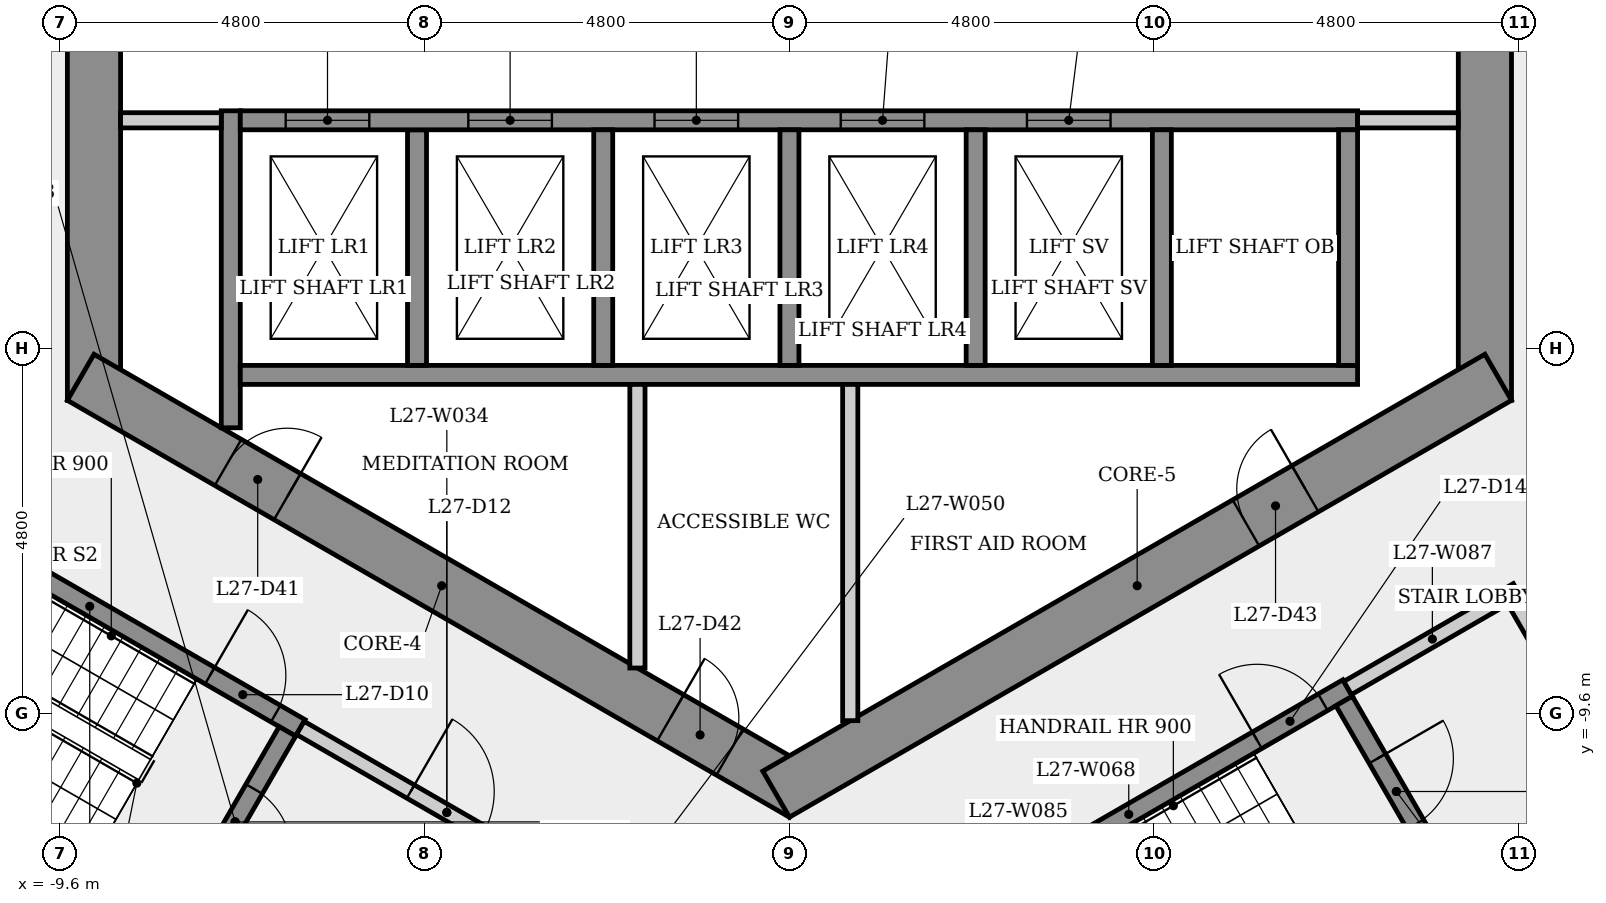
"""IFC4 building model, lengths in metres.
Left out: names, types, materials, properties, quantities, classifications, styles, units other than length and angle.
Written with IfcOpenShell. Run it as: python <this file> out.ifc"""

import sys

from ifc_helpers import new_model, si_unit, direction, frame, frame_2d, origin, place, context, subcontext, project, spatial, rectangle, extrude, element, fill, save


model = new_model("IFC4")
c1 = context("Model", 3, precision=1e-05, world=origin(), true_north=direction((0.0, 1.0)))
c2 = subcontext(c1, "Body", "Model", "MODEL_VIEW")
j1 = project(units=[si_unit("LENGTHUNIT", "METRE"), si_unit("PLANEANGLEUNIT", "RADIAN")], contexts=[c1])
p1 = place(None, origin())
s1 = spatial("IfcSite", under=j1, at=p1, CompositionType="ELEMENT")
p2 = place(p1, origin())
s2 = spatial("IfcBuilding", under=s1, at=p2, CompositionType="ELEMENT")
p3 = place(p2, frame((0.0, 0.0, 103.5)))
s3 = spatial("IfcBuildingStorey", under=s2, at=p3, CompositionType="ELEMENT", Elevation=103.5)
p4 = place(p3, frame((9.15, -5.485, 0.0), z_axis=(0.0, 0.0, 1.0), x_axis=(0.0, 1.0, 0.0)))
e1 = element("IfcWall", 1, at=p4, inside=s3, PredefinedType="SHEAR", context=c2, shape_type="SweptSolid", body=[
    extrude(rectangle(XDim=10.97, YDim=0.7, at=frame_2d((5.485, 0.0))), origin(), (0.0, 0.0, 1.0), 3.4),
])
p5 = place(p4, frame((4.685, 0.0, 0.0)))
e2 = element("IfcOpeningElement", 2, at=p5, cuts=e1, PredefinedType="OPENING", context=c2, shape_type="SweptSolid", body=[
    extrude(rectangle(XDim=1.6, YDim=2.1, at=frame_2d((0.8, 1.05))), frame((0.0, 0.36, 0.0), z_axis=(0.0, -1.0, 0.0), x_axis=(1.0, 0.0, 0.0)), (0.0, 0.0, 1.0), 0.72),
])
p6 = place(p3, frame((-9.15, 5.485, 0.0), z_axis=(0.0, 0.0, 1.0), x_axis=(0.0, -1.0, 0.0)))
e3 = element("IfcWall", 3, at=p6, inside=s3, PredefinedType="SHEAR", context=c2, shape_type="SweptSolid", body=[
    extrude(rectangle(XDim=10.97, YDim=0.7, at=frame_2d((5.485, 0.0))), origin(), (0.0, 0.0, 1.0), 3.4),
])
p7 = place(p6, frame((4.685, 0.0, 0.0)))
e4 = element("IfcOpeningElement", 4, at=p7, cuts=e3, PredefinedType="OPENING", context=c2, shape_type="SweptSolid", body=[
    extrude(rectangle(XDim=1.6, YDim=2.1, at=frame_2d((0.8, 1.05))), frame((0.0, 0.36, 0.0), z_axis=(0.0, -1.0, 0.0), x_axis=(1.0, 0.0, 0.0)), (0.0, 0.0, 1.0), 0.72),
])
p8 = place(p3, frame((-9.325, -5.182, 0.0), z_axis=(0.0, 0.0, 1.0), x_axis=(0.866023993627, -0.500002442456, 0.0)))
e5 = element("IfcWall", 5, at=p8, inside=s3, PredefinedType="SHEAR", context=c2, shape_type="SweptSolid", body=[
    extrude(rectangle(XDim=10.97, YDim=0.7, at=frame_2d((5.485, 0.0))), origin(), (0.0, 0.0, 1.0), 3.4),
])
p9 = place(p8, frame((2.239, 0.0, 0.0)))
e6 = element("IfcOpeningElement", 6, at=p9, cuts=e5, PredefinedType="OPENING", context=c2, shape_type="SweptSolid", body=[
    extrude(rectangle(XDim=0.9, YDim=2.1, at=frame_2d((0.45, 1.05))), frame((0.0, 0.36, 0.0), z_axis=(0.0, -1.0, 0.0), x_axis=(1.0, 0.0, 0.0)), (0.0, 0.0, 1.0), 0.72),
])
p10 = place(p8, frame((8.96, 0.0, 0.0)))
e7 = element("IfcOpeningElement", 7, at=p10, cuts=e5, PredefinedType="OPENING", context=c2, shape_type="SweptSolid", body=[
    extrude(rectangle(XDim=0.9, YDim=2.1, at=frame_2d((0.45, 1.05))), frame((0.0, 0.36, 0.0), z_axis=(0.0, -1.0, 0.0), x_axis=(1.0, 0.0, 0.0)), (0.0, 0.0, 1.0), 0.72),
])
p11 = place(p3, frame((-0.175, -10.667, 0.0), z_axis=(0.0, 0.0, 1.0), x_axis=(0.866023993627, 0.500002442456, 0.0)))
e8 = element("IfcWall", 8, at=p11, inside=s3, PredefinedType="SHEAR", context=c2, shape_type="SweptSolid", body=[
    extrude(rectangle(XDim=10.97, YDim=0.7, at=frame_2d((5.485, 0.0))), origin(), (0.0, 0.0, 1.0), 3.4),
])
p12 = place(p11, frame((7.137, 0.0, 0.0)))
e9 = element("IfcOpeningElement", 9, at=p12, cuts=e8, PredefinedType="OPENING", context=c2, shape_type="SweptSolid", body=[
    extrude(rectangle(XDim=0.9, YDim=2.1, at=frame_2d((0.45, 1.05))), frame((0.0, 0.36, 0.0), z_axis=(0.0, -1.0, 0.0), x_axis=(1.0, 0.0, 0.0)), (0.0, 0.0, 1.0), 0.72),
])
p13 = place(p3, frame((-11.977, -6.595, 0.0), z_axis=(0.0, 0.0, 1.0), x_axis=(0.866025499775, -0.499999833739, 0.0)))
e10 = element("IfcWall", 10, at=p13, inside=s3, PredefinedType="SHEAR", context=c2, shape_type="SweptSolid", body=[
    extrude(rectangle(XDim=6.4, YDim=0.25, at=frame_2d((3.2, 0.0))), origin(), (0.0, 0.0, 1.0), 3.05),
])
p14 = place(p13, frame((5.025, 0.0, 0.0)))
e11 = element("IfcOpeningElement", 11, at=p14, cuts=e10, PredefinedType="OPENING", context=c2, shape_type="SweptSolid", body=[
    extrude(rectangle(XDim=1.0, YDim=2.1, at=frame_2d((0.5, 1.05))), frame((0.0, 0.135, 0.0), z_axis=(0.0, -1.0, 0.0), x_axis=(1.0, 0.0, 0.0)), (0.0, 0.0, 1.0), 0.27),
])
p15 = place(p3, frame((-7.935, -12.393, 0.0), z_axis=(0.0, 0.0, 1.0), x_axis=(-0.866025499775, 0.499999833739, 0.0)))
e12 = element("IfcWall", 12, at=p15, inside=s3, PredefinedType="SHEAR", context=c2, shape_type="SweptSolid", body=[
    extrude(rectangle(XDim=6.4, YDim=0.25, at=frame_2d((3.2, 0.0))), origin(), (0.0, 0.0, 1.0), 3.05),
])
p16 = place(p3, frame((-7.35, -5.846, 0.0), z_axis=(0.0, 0.0, 1.0), x_axis=(0.0, 1.0, 0.0)))
e13 = element("IfcWall", 13, at=p16, inside=s3, PredefinedType="SHEAR", context=c2, shape_type="SweptSolid", body=[
    extrude(rectangle(XDim=4.171, YDim=0.25, at=frame_2d((2.085, 0.0))), origin(), (0.0, 0.0, 1.0), 3.05),
])
p17 = place(p3, frame((-7.475, -1.8, 0.0), z_axis=(0.0, 0.0, 1.0), x_axis=(-1.0, 0.0, 0.0)))
e14 = element("IfcWall", 14, at=p17, inside=s3, PredefinedType="PARTITIONING", context=c2, shape_type="SweptSolid", body=[
    extrude(rectangle(XDim=1.325, YDim=0.2, at=frame_2d((0.663, 0.0))), origin(), (0.0, 0.0, 1.0), 3.05),
])
p18 = place(p3, frame((-6.605, -9.841, 0.0), z_axis=(0.0, 0.0, 1.0), x_axis=(-0.499996545922, -0.866027397988, 0.0)))
e15 = element("IfcWall", 15, at=p18, inside=s3, PredefinedType="SHEAR", context=c2, shape_type="SweptSolid", body=[
    extrude(rectangle(XDim=2.75, YDim=0.25, at=frame_2d((1.375, 0.0))), origin(), (0.0, 0.0, 1.0), 3.05),
])
p19 = place(p18, frame((0.875, 0.0, 0.0)))
e16 = element("IfcOpeningElement", 16, at=p19, cuts=e15, PredefinedType="OPENING", context=c2, shape_type="SweptSolid", body=[
    extrude(rectangle(XDim=1.0, YDim=2.1, at=frame_2d((0.5, 1.05))), frame((0.0, 0.135, 0.0), z_axis=(0.0, -1.0, 0.0), x_axis=(1.0, 0.0, 0.0)), (0.0, 0.0, 1.0), 0.27),
])
p20 = place(p3, frame((-6.435, -9.795, 0.0), z_axis=(0.0, 0.0, 1.0), x_axis=(0.866012907634, -0.500021643343, 0.0)))
e17 = element("IfcWall", 17, at=p20, inside=s3, PredefinedType="PARTITIONING", context=c2, shape_type="SweptSolid", body=[
    extrude(rectangle(XDim=4.45, YDim=0.2, at=frame_2d((2.225, 0.0))), origin(), (0.0, 0.0, 1.0), 3.05),
])
p21 = place(p20, frame((1.675, 0.0, 0.0)))
e18 = element("IfcOpeningElement", 18, at=p21, cuts=e17, PredefinedType="OPENING", context=c2, shape_type="SweptSolid", body=[
    extrude(rectangle(XDim=1.1, YDim=2.1, at=frame_2d((0.55, 1.05))), frame((0.0, 0.11, 0.0), z_axis=(0.0, -1.0, 0.0), x_axis=(1.0, 0.0, 0.0)), (0.0, 0.0, 1.0), 0.22),
])
p22 = place(p3, frame((-7.225, -5.15, 0.0), z_axis=(0.0, 0.0, 1.0), x_axis=(1.0, 0.0, 0.0)))
e19 = element("IfcWall", 19, at=p22, inside=s3, PredefinedType="SHEAR", context=c2, shape_type="SweptSolid", body=[
    extrude(rectangle(XDim=14.7, YDim=0.25, at=frame_2d((7.35, 0.0))), origin(), (0.0, 0.0, 1.0), 3.05),
])
p23 = place(p3, frame((-4.9, -1.925, 0.0), z_axis=(0.0, 0.0, 1.0), x_axis=(0.0, -1.0, 0.0)))
e20 = element("IfcWall", 20, at=p23, inside=s3, PredefinedType="SHEAR", context=c2, shape_type="SweptSolid", body=[
    extrude(rectangle(XDim=3.1, YDim=0.25, at=frame_2d((1.55, 0.0))), origin(), (0.0, 0.0, 1.0), 3.4),
])
p24 = place(p3, frame((-7.225, -1.8, 0.0), z_axis=(0.0, 0.0, 1.0), x_axis=(1.0, 0.0, 0.0)))
e21 = element("IfcWall", 21, at=p24, inside=s3, PredefinedType="SHEAR", context=c2, shape_type="SweptSolid", body=[
    extrude(rectangle(XDim=14.7, YDim=0.25, at=frame_2d((7.35, 0.0))), origin(), (0.0, 0.0, 1.0), 3.05),
])
p25 = place(p24, frame((0.597, 0.0, 0.0)))
e22 = element("IfcOpeningElement", 22, at=p25, cuts=e21, PredefinedType="OPENING", context=c2, shape_type="SweptSolid", body=[
    extrude(rectangle(XDim=1.1, YDim=2.1, at=frame_2d((0.55, 1.05))), frame((0.0, 0.135, 0.0), z_axis=(0.0, -1.0, 0.0), x_axis=(1.0, 0.0, 0.0)), (0.0, 0.0, 1.0), 0.27),
])
p26 = place(p24, frame((3.0, 0.0, 0.0)))
e23 = element("IfcOpeningElement", 23, at=p26, cuts=e21, PredefinedType="OPENING", context=c2, shape_type="SweptSolid", body=[
    extrude(rectangle(XDim=1.1, YDim=2.1, at=frame_2d((0.55, 1.05))), frame((0.0, 0.135, 0.0), z_axis=(0.0, -1.0, 0.0), x_axis=(1.0, 0.0, 0.0)), (0.0, 0.0, 1.0), 0.27),
])
p27 = place(p24, frame((5.45, 0.0, 0.0)))
e24 = element("IfcOpeningElement", 24, at=p27, cuts=e21, PredefinedType="OPENING", context=c2, shape_type="SweptSolid", body=[
    extrude(rectangle(XDim=1.1, YDim=2.1, at=frame_2d((0.55, 1.05))), frame((0.0, 0.135, 0.0), z_axis=(0.0, -1.0, 0.0), x_axis=(1.0, 0.0, 0.0)), (0.0, 0.0, 1.0), 0.27),
])
p28 = place(p24, frame((7.9, 0.0, 0.0)))
e25 = element("IfcOpeningElement", 25, at=p28, cuts=e21, PredefinedType="OPENING", context=c2, shape_type="SweptSolid", body=[
    extrude(rectangle(XDim=1.1, YDim=2.1, at=frame_2d((0.55, 1.05))), frame((0.0, 0.135, 0.0), z_axis=(0.0, -1.0, 0.0), x_axis=(1.0, 0.0, 0.0)), (0.0, 0.0, 1.0), 0.27),
])
p29 = place(p24, frame((10.35, 0.0, 0.0)))
e26 = element("IfcOpeningElement", 26, at=p29, cuts=e21, PredefinedType="OPENING", context=c2, shape_type="SweptSolid", body=[
    extrude(rectangle(XDim=1.1, YDim=2.1, at=frame_2d((0.55, 1.05))), frame((0.0, 0.135, 0.0), z_axis=(0.0, -1.0, 0.0), x_axis=(1.0, 0.0, 0.0)), (0.0, 0.0, 1.0), 0.27),
])
p30 = place(p3, frame((-2.45, -1.925, 0.0), z_axis=(0.0, 0.0, 1.0), x_axis=(0.0, -1.0, 0.0)))
e27 = element("IfcWall", 27, at=p30, inside=s3, PredefinedType="SHEAR", context=c2, shape_type="SweptSolid", body=[
    extrude(rectangle(XDim=3.1, YDim=0.25, at=frame_2d((1.55, 0.0))), origin(), (0.0, 0.0, 1.0), 3.4),
])
p31 = place(p3, frame((-2.0, -5.275, 0.0), z_axis=(0.0, 0.0, 1.0), x_axis=(0.0, -1.0, 0.0)))
e28 = element("IfcWall", 28, at=p31, inside=s3, PredefinedType="PARTITIONING", context=c2, shape_type="SweptSolid", body=[
    extrude(rectangle(XDim=3.732, YDim=0.2, at=frame_2d((1.866, 0.0))), origin(), (0.0, 0.0, 1.0), 3.05),
])
p32 = place(p3, frame((0.0, -1.925, 0.0), z_axis=(0.0, 0.0, 1.0), x_axis=(0.0, -1.0, 0.0)))
e29 = element("IfcWall", 29, at=p32, inside=s3, PredefinedType="SHEAR", context=c2, shape_type="SweptSolid", body=[
    extrude(rectangle(XDim=3.1, YDim=0.25, at=frame_2d((1.55, 0.0))), origin(), (0.0, 0.0, 1.0), 3.4),
])
p33 = place(p3, frame((0.8, -5.275, 0.0), z_axis=(0.0, 0.0, 1.0), x_axis=(0.0, -1.0, 0.0)))
e30 = element("IfcWall", 30, at=p33, inside=s3, PredefinedType="PARTITIONING", context=c2, shape_type="SweptSolid", body=[
    extrude(rectangle(XDim=4.425, YDim=0.2, at=frame_2d((2.212, 0.0))), origin(), (0.0, 0.0, 1.0), 3.05),
])
p34 = place(p3, frame((1.585, -12.595, 0.0), z_axis=(0.0, 0.0, 1.0), x_axis=(0.866036417653, 0.499980922934, 0.0)))
e31 = element("IfcWall", 31, at=p34, inside=s3, PredefinedType="SHEAR", context=c2, shape_type="SweptSolid", body=[
    extrude(rectangle(XDim=6.65, YDim=0.25, at=frame_2d((3.325, 0.0))), origin(), (0.0, 0.0, 1.0), 3.05),
])
p35 = place(p34, frame((5.275, 0.0, 0.0)))
e32 = element("IfcOpeningElement", 32, at=p35, cuts=e31, PredefinedType="OPENING", context=c2, shape_type="SweptSolid", body=[
    extrude(rectangle(XDim=1.0, YDim=2.1, at=frame_2d((0.5, 1.05))), frame((0.0, 0.135, 0.0), z_axis=(0.0, -1.0, 0.0), x_axis=(1.0, 0.0, 0.0)), (0.0, 0.0, 1.0), 0.27),
])
for number, where, z_axis, x_axis in (
    (33, (2.45, -1.925, 0.0), (0.0, 0.0, 1.0), (0.0, -1.0, 0.0)),
    (34, (4.9, -1.925, 0.0), (0.0, 0.0, 1.0), (0.0, -1.0, 0.0)),
):
    element("IfcWall", number, at=place(p3, frame(where, z_axis=z_axis, x_axis=x_axis)), inside=s3, PredefinedType="SHEAR", context=c2, shape_type="SweptSolid", body=[
        extrude(rectangle(XDim=3.1, YDim=0.25, at=frame_2d((1.55, 0.0))), origin(), (0.0, 0.0, 1.0), 3.4),
    ])
p36 = place(p3, frame((7.298, -9.441, 0.0), z_axis=(0.0, 0.0, 1.0), x_axis=(0.500034990121, -0.866005201286, 0.0)))
e35 = element("IfcWall", 35, at=p36, inside=s3, PredefinedType="SHEAR", context=c2, shape_type="SweptSolid", body=[
    extrude(rectangle(XDim=2.75, YDim=0.25, at=frame_2d((1.375, 0.0))), origin(), (0.0, 0.0, 1.0), 3.05),
])
p37 = place(p36, frame((0.875, 0.0, 0.0)))
e36 = element("IfcOpeningElement", 36, at=p37, cuts=e35, PredefinedType="OPENING", context=c2, shape_type="SweptSolid", body=[
    extrude(rectangle(XDim=1.0, YDim=2.1, at=frame_2d((0.5, 1.05))), frame((0.0, 0.135, 0.0), z_axis=(0.0, -1.0, 0.0), x_axis=(1.0, 0.0, 0.0)), (0.0, 0.0, 1.0), 0.27),
])
p38 = place(p3, frame((7.344, -9.27, 0.0), z_axis=(0.0, 0.0, 1.0), x_axis=(0.866005588531, 0.500034319456, 0.0)))
e37 = element("IfcWall", 37, at=p38, inside=s3, PredefinedType="PARTITIONING", context=c2, shape_type="SweptSolid", body=[
    extrude(rectangle(XDim=2.575, YDim=0.2, at=frame_2d((1.288, 0.0))), origin(), (0.0, 0.0, 1.0), 3.05),
])
p39 = place(p3, frame((7.35, -1.925, 0.0), z_axis=(0.0, 0.0, 1.0), x_axis=(0.0, -1.0, 0.0)))
e38 = element("IfcWall", 38, at=p39, inside=s3, PredefinedType="SHEAR", context=c2, shape_type="SweptSolid", body=[
    extrude(rectangle(XDim=3.1, YDim=0.25, at=frame_2d((1.55, 0.0))), origin(), (0.0, 0.0, 1.0), 3.4),
])
p40 = place(p3, frame((8.8, -1.8, 0.0), z_axis=(0.0, 0.0, 1.0), x_axis=(-1.0, 0.0, 0.0)))
e39 = element("IfcWall", 39, at=p40, inside=s3, PredefinedType="PARTITIONING", context=c2, shape_type="SweptSolid", body=[
    extrude(rectangle(XDim=1.325, YDim=0.2, at=frame_2d((0.663, 0.0))), origin(), (0.0, 0.0, 1.0), 3.05),
])
p41 = place(p3, frame((9.537, -8.119, 0.0), z_axis=(0.0, 0.0, 1.0), x_axis=(0.499990139034, -0.866031096941, 0.0)))
e40 = element("IfcWall", 40, at=p41, inside=s3, PredefinedType="PARTITIONING", context=c2, shape_type="SweptSolid", body=[
    extrude(rectangle(XDim=3.0, YDim=0.2, at=frame_2d((1.5, 0.0))), origin(), (0.0, 0.0, 1.0), 3.05),
])
p42 = place(p41, frame((0.935, 0.0, 0.0)))
e41 = element("IfcOpeningElement", 41, at=p42, cuts=e40, PredefinedType="OPENING", context=c2, shape_type="SweptSolid", body=[
    extrude(rectangle(XDim=1.0, YDim=2.1, at=frame_2d((0.5, 1.05))), frame((0.0, 0.11, 0.0), z_axis=(0.0, -1.0, 0.0), x_axis=(1.0, 0.0, 0.0)), (0.0, 0.0, 1.0), 0.22),
])
p43 = place(p3, frame((10.901, -10.681, 0.0), z_axis=(0.0, 0.0, 1.0), x_axis=(-0.866007538022, -0.500030943131, 0.0)))
e42 = element("IfcWall", 42, at=p43, inside=s3, PredefinedType="PARTITIONING", context=c2, shape_type="SweptSolid", body=[
    extrude(rectangle(XDim=2.375, YDim=0.2, at=frame_2d((1.188, 0.0))), origin(), (0.0, 0.0, 1.0), 3.05),
])
p44 = place(p25, origin())
e43 = element("IfcDoor", 43, at=p44, inside=s3, OperationType="SLIDING_TO_LEFT", PredefinedType="DOOR", context=c2, shape_type="SweptSolid", body=[
    extrude(rectangle(XDim=1.1, YDim=2.1, at=frame_2d((0.55, 1.05))), frame((0.0, 0.025, 0.0), z_axis=(0.0, -1.0, 0.0), x_axis=(1.0, 0.0, 0.0)), (0.0, 0.0, 1.0), 0.05),
])
fill(e22, e43)
p45 = place(p26, origin())
e44 = element("IfcDoor", 44, at=p45, inside=s3, OperationType="SLIDING_TO_LEFT", PredefinedType="DOOR", context=c2, shape_type="SweptSolid", body=[
    extrude(rectangle(XDim=1.1, YDim=2.1, at=frame_2d((0.55, 1.05))), frame((0.0, 0.025, 0.0), z_axis=(0.0, -1.0, 0.0), x_axis=(1.0, 0.0, 0.0)), (0.0, 0.0, 1.0), 0.05),
])
fill(e23, e44)
p46 = place(p27, origin())
e45 = element("IfcDoor", 45, at=p46, inside=s3, OperationType="SLIDING_TO_LEFT", PredefinedType="DOOR", context=c2, shape_type="SweptSolid", body=[
    extrude(rectangle(XDim=1.1, YDim=2.1, at=frame_2d((0.55, 1.05))), frame((0.0, 0.025, 0.0), z_axis=(0.0, -1.0, 0.0), x_axis=(1.0, 0.0, 0.0)), (0.0, 0.0, 1.0), 0.05),
])
fill(e24, e45)
p47 = place(p28, origin())
e46 = element("IfcDoor", 46, at=p47, inside=s3, OperationType="SLIDING_TO_LEFT", PredefinedType="DOOR", context=c2, shape_type="SweptSolid", body=[
    extrude(rectangle(XDim=1.1, YDim=2.1, at=frame_2d((0.55, 1.05))), frame((0.0, 0.025, 0.0), z_axis=(0.0, -1.0, 0.0), x_axis=(1.0, 0.0, 0.0)), (0.0, 0.0, 1.0), 0.05),
])
fill(e25, e46)
p48 = place(p29, origin())
e47 = element("IfcDoor", 47, at=p48, inside=s3, OperationType="SLIDING_TO_LEFT", PredefinedType="DOOR", context=c2, shape_type="SweptSolid", body=[
    extrude(rectangle(XDim=1.1, YDim=2.1, at=frame_2d((0.55, 1.05))), frame((0.0, 0.025, 0.0), z_axis=(0.0, -1.0, 0.0), x_axis=(1.0, 0.0, 0.0)), (0.0, 0.0, 1.0), 0.05),
])
fill(e26, e47)
p49 = place(p14, origin())
e48 = element("IfcDoor", 48, at=p49, inside=s3, OperationType="SINGLE_SWING_LEFT", PredefinedType="DOOR", context=c2, shape_type="SweptSolid", body=[
    extrude(rectangle(XDim=1.0, YDim=2.1, at=frame_2d((0.5, 1.05))), frame((0.0, 0.025, 0.0), z_axis=(0.0, -1.0, 0.0), x_axis=(1.0, 0.0, 0.0)), (0.0, 0.0, 1.0), 0.05),
])
fill(e11, e48)
p50 = place(p19, origin())
e49 = element("IfcDoor", 49, at=p50, inside=s3, OperationType="SINGLE_SWING_RIGHT", PredefinedType="DOOR", context=c2, shape_type="SweptSolid", body=[
    extrude(rectangle(XDim=1.0, YDim=2.1, at=frame_2d((0.5, 1.05))), frame((0.0, 0.025, 0.0), z_axis=(0.0, -1.0, 0.0), x_axis=(1.0, 0.0, 0.0)), (0.0, 0.0, 1.0), 0.05),
])
fill(e16, e49)
p51 = place(p21, origin())
e50 = element("IfcDoor", 50, at=p51, inside=s3, OperationType="SINGLE_SWING_LEFT", PredefinedType="DOOR", context=c2, shape_type="SweptSolid", body=[
    extrude(rectangle(XDim=1.1, YDim=2.1, at=frame_2d((0.55, 1.05))), frame((0.0, 0.025, 0.0), z_axis=(0.0, -1.0, 0.0), x_axis=(1.0, 0.0, 0.0)), (0.0, 0.0, 1.0), 0.05),
])
fill(e18, e50)
p52 = place(p35, origin())
e51 = element("IfcDoor", 51, at=p52, inside=s3, OperationType="SINGLE_SWING_LEFT", PredefinedType="DOOR", context=c2, shape_type="SweptSolid", body=[
    extrude(rectangle(XDim=1.0, YDim=2.1, at=frame_2d((0.5, 1.05))), frame((0.0, 0.025, 0.0), z_axis=(0.0, -1.0, 0.0), x_axis=(1.0, 0.0, 0.0)), (0.0, 0.0, 1.0), 0.05),
])
fill(e32, e51)
p53 = place(p37, origin())
e52 = element("IfcDoor", 52, at=p53, inside=s3, OperationType="SINGLE_SWING_LEFT", PredefinedType="DOOR", context=c2, shape_type="SweptSolid", body=[
    extrude(rectangle(XDim=1.0, YDim=2.1, at=frame_2d((0.5, 1.05))), frame((0.0, 0.025, 0.0), z_axis=(0.0, -1.0, 0.0), x_axis=(1.0, 0.0, 0.0)), (0.0, 0.0, 1.0), 0.05),
])
fill(e36, e52)
p54 = place(p9, origin())
e53 = element("IfcDoor", 53, at=p54, inside=s3, OperationType="SINGLE_SWING_RIGHT", PredefinedType="DOOR", context=c2, shape_type="SweptSolid", body=[
    extrude(rectangle(XDim=0.9, YDim=2.1, at=frame_2d((0.45, 1.05))), frame((0.0, 0.025, 0.0), z_axis=(0.0, -1.0, 0.0), x_axis=(1.0, 0.0, 0.0)), (0.0, 0.0, 1.0), 0.05),
])
fill(e6, e53)
p55 = place(p10, origin())
e54 = element("IfcDoor", 54, at=p55, inside=s3, OperationType="SINGLE_SWING_LEFT", PredefinedType="DOOR", context=c2, shape_type="SweptSolid", body=[
    extrude(rectangle(XDim=0.9, YDim=2.1, at=frame_2d((0.45, 1.05))), frame((0.0, 0.025, 0.0), z_axis=(0.0, -1.0, 0.0), x_axis=(1.0, 0.0, 0.0)), (0.0, 0.0, 1.0), 0.05),
])
fill(e7, e54)
p56 = place(p12, origin())
e55 = element("IfcDoor", 55, at=p56, inside=s3, OperationType="SINGLE_SWING_RIGHT", PredefinedType="DOOR", context=c2, shape_type="SweptSolid", body=[
    extrude(rectangle(XDim=0.9, YDim=2.1, at=frame_2d((0.45, 1.05))), frame((0.0, 0.025, 0.0), z_axis=(0.0, -1.0, 0.0), x_axis=(1.0, 0.0, 0.0)), (0.0, 0.0, 1.0), 0.05),
])
fill(e9, e55)
save(model, sys.argv[1])
